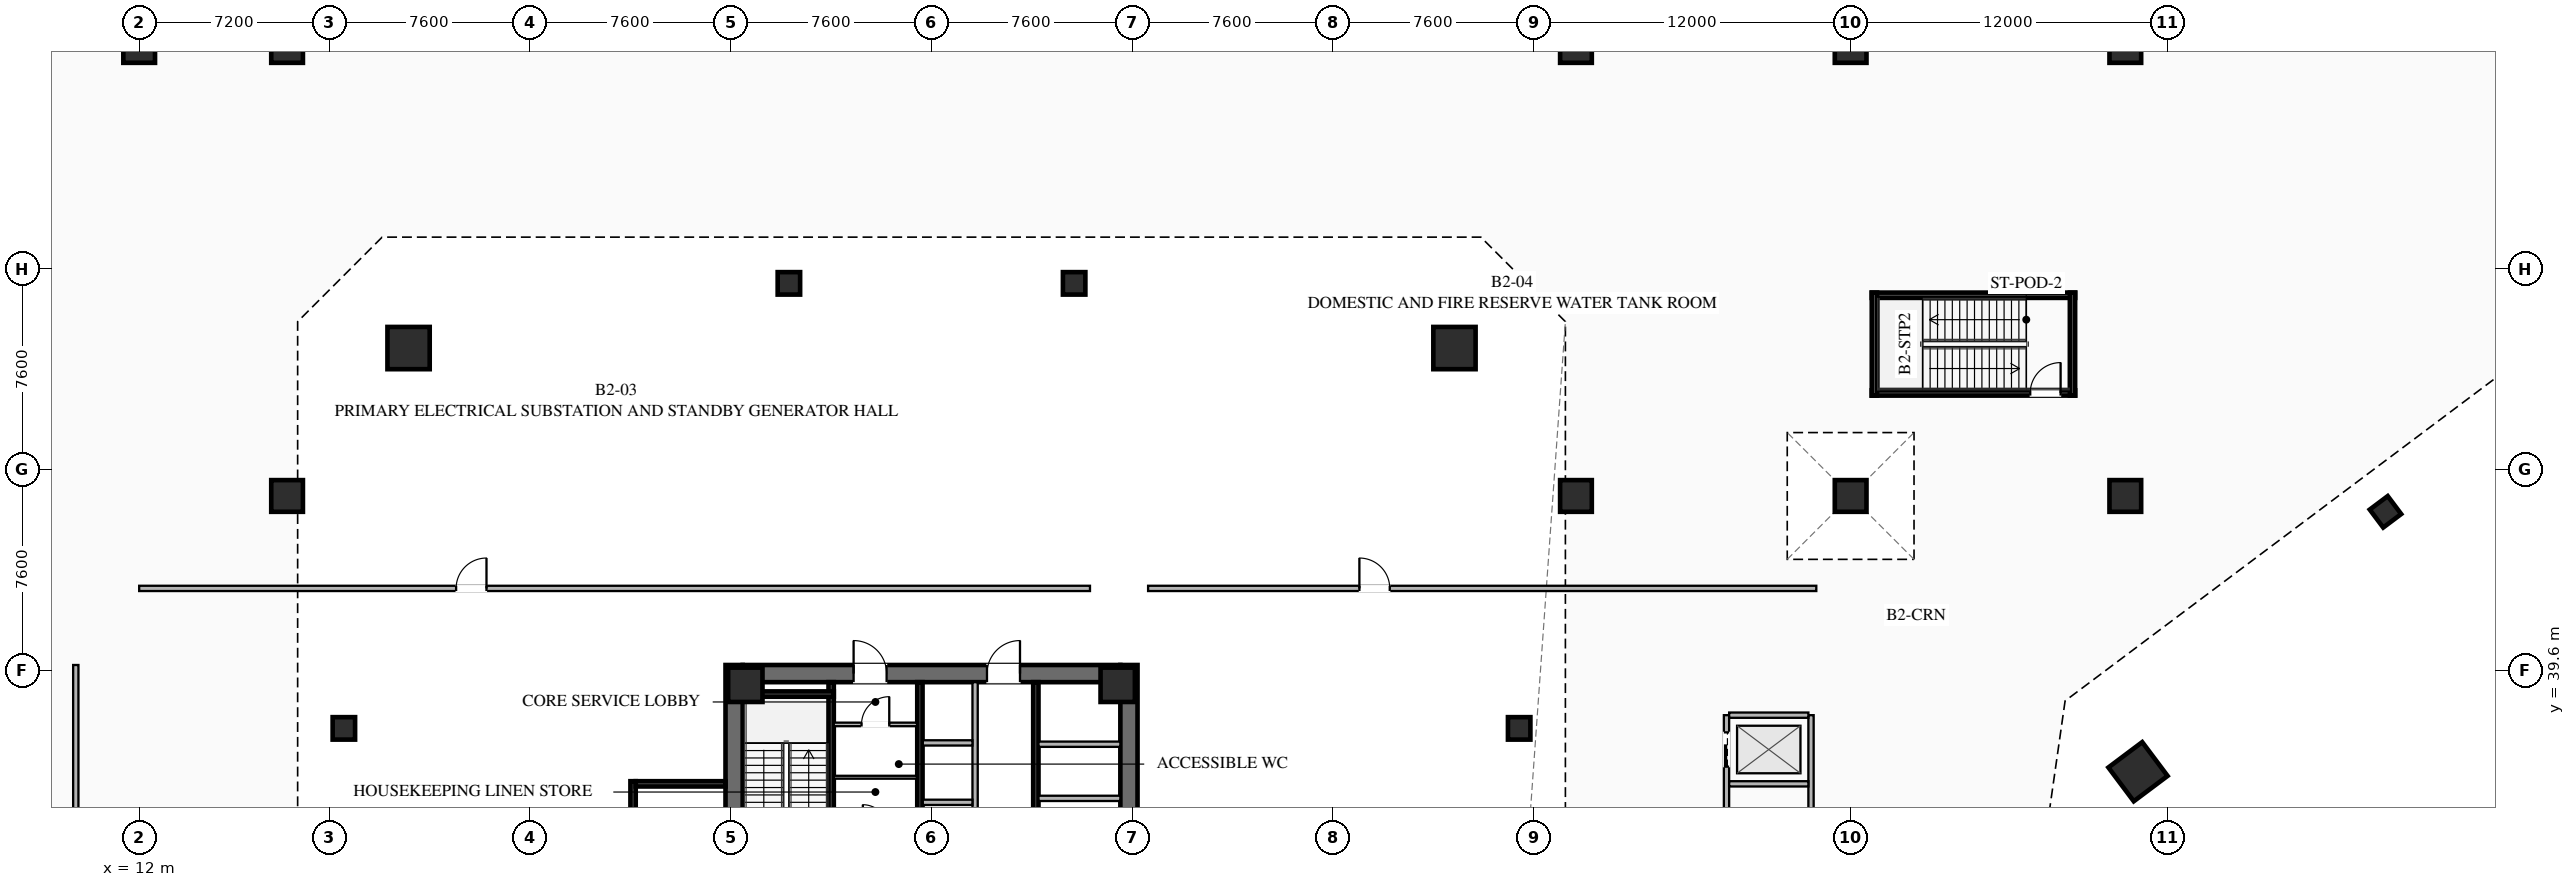
"""IFC4 building model, lengths in metres.
Left out: names, types, materials, properties, quantities, classifications, styles, units other than length and angle.
Written with IfcOpenShell. Run it as: python <this file> out.ifc"""

import sys

from ifc_helpers import new_model, si_unit, direction, frame, frame_2d, origin, origin_2d, place, context, subcontext, project, spatial, rectangle, hollow_rectangle, extrude, element, fill, save


model = new_model("IFC4")
c1 = context("Model", 3, precision=1e-05, world=origin(), true_north=direction((0.0, 1.0)))
c2 = subcontext(c1, "Body", "Model", "MODEL_VIEW")
j1 = project(units=[si_unit("LENGTHUNIT", "METRE"), si_unit("PLANEANGLEUNIT", "RADIAN")], contexts=[c1])
p1 = place(None, origin())
s1 = spatial("IfcSite", under=j1, at=p1, CompositionType="ELEMENT")
p2 = place(p1, origin())
s2 = spatial("IfcBuilding", under=s1, at=p2, CompositionType="ELEMENT")
p3 = place(p2, frame((0.0, 0.0, -11.0)))
s3 = spatial("IfcBuildingStorey", under=s2, at=p3, CompositionType="ELEMENT", Elevation=-11.0)
for number, where, z_axis, x_axis in (
    (1, (34.525, 24.2, 0.0), (0.0, 0.0, 1.0), (0.0, 1.0, 0.0)),
    (2, (49.475, 39.8, 0.0), (0.0, 0.0, 1.0), (0.0, -1.0, 0.0)),
):
    element("IfcWall", number, at=place(p3, frame(where, z_axis=z_axis, x_axis=x_axis)), inside=s3, PredefinedType="SHEAR", context=c2, shape_type="SweptSolid", body=[
        extrude(rectangle(XDim=15.6, YDim=0.65, at=frame_2d((7.8, 0.0))), origin(), (0.0, 0.0, 1.0), 5.5),
    ])
p4 = place(p3, frame((34.85, 39.475, 0.0), z_axis=(0.0, 0.0, 1.0), x_axis=(1.0, 0.0, 0.0)))
e3 = element("IfcWall", 3, at=p4, inside=s3, PredefinedType="SHEAR", context=c2, shape_type="SweptSolid", body=[
    extrude(rectangle(XDim=14.3, YDim=0.65, at=frame_2d((7.15, 0.0))), origin(), (0.0, 0.0, 1.0), 5.5),
])
p5 = place(p4, frame((4.2, 0.0, 0.0)))
e4 = element("IfcOpeningElement", 4, at=p5, cuts=e3, PredefinedType="OPENING", context=c2, shape_type="SweptSolid", body=[
    extrude(rectangle(XDim=1.25, YDim=2.25, at=frame_2d((0.625, 1.125))), frame((0.0, 0.335, 0.0), z_axis=(0.0, -1.0, 0.0), x_axis=(1.0, 0.0, 0.0)), (0.0, 0.0, 1.0), 0.67),
])
p6 = place(p4, frame((9.25, 0.0, 0.0)))
e5 = element("IfcOpeningElement", 5, at=p6, cuts=e3, PredefinedType="OPENING", context=c2, shape_type="SweptSolid", body=[
    extrude(rectangle(XDim=1.25, YDim=2.25, at=frame_2d((0.625, 1.125))), frame((0.0, 0.335, 0.0), z_axis=(0.0, -1.0, 0.0), x_axis=(1.0, 0.0, 0.0)), (0.0, 0.0, 1.0), 0.67),
])
for number, where, z_axis, x_axis in (
    (6, (49.05, 39.05, 0.0), (0.0, 0.0, 1.0), (1.0, 0.0, 0.0)),
    (7, (34.95, 39.05, 0.0), (0.0, 0.0, 1.0), (1.0, 0.0, 0.0)),
):
    element("IfcColumn", number, at=place(p3, frame(where, z_axis=z_axis, x_axis=x_axis)), inside=s3, PredefinedType="COLUMN", context=c2, shape_type="SweptSolid", body=[
        extrude(hollow_rectangle(XDim=1.3, YDim=1.3, WallThickness=0.05, at=origin_2d()), origin(), (0.0, 0.0, 1.0), 5.24),
    ])
for number, where, z_axis, x_axis in (
    (8, (61.8, 51.8, 0.0), (0.0, 0.0, 1.0), (1.0, 0.0, 0.0)),
    (9, (22.2, 51.8, 0.0), (0.0, 0.0, 1.0), (1.0, 0.0, 0.0)),
):
    element("IfcColumn", number, at=place(p3, frame(where, z_axis=z_axis, x_axis=x_axis)), inside=s3, PredefinedType="COLUMN", context=c2, shape_type="SweptSolid", body=[
        extrude(hollow_rectangle(XDim=1.6, YDim=1.6, WallThickness=0.06, at=origin_2d()), origin(), (0.0, 0.0, 1.0), 5.24),
    ])
for number, where, z_axis, x_axis in (
    (10, (64.25, 37.4, 0.0), (0.0, 0.0, 1.0), (1.0, 0.0, 0.0)),
    (11, (47.4, 54.25, 0.0), (0.0, 0.0, 1.0), (1.0, 0.0, 0.0)),
    (12, (36.6, 54.25, 0.0), (0.0, 0.0, 1.0), (1.0, 0.0, 0.0)),
    (13, (19.75, 37.4, 0.0), (0.0, 0.0, 1.0), (1.0, 0.0, 0.0)),
):
    element("IfcColumn", number, at=place(p3, frame(where, z_axis=z_axis, x_axis=x_axis)), inside=s3, PredefinedType="COLUMN", context=c2, shape_type="SweptSolid", body=[
        extrude(hollow_rectangle(XDim=0.85, YDim=0.85, WallThickness=0.035, at=origin_2d()), origin(), (0.0, 0.0, 1.0), 5.24),
    ])
p7 = place(p3, frame((87.68, 35.76, 0.0), z_axis=(0.0, 0.0, 1.0), x_axis=(0.799999996291, 0.600000004945, 0.0)))
e14 = element("IfcColumn", 14, at=p7, inside=s3, PredefinedType="COLUMN", context=c2, shape_type="SweptSolid", body=[
    extrude(hollow_rectangle(XDim=1.6, YDim=1.6, WallThickness=0.06, at=origin_2d()), origin(), (0.0, 0.0, 1.0), 5.24),
])
p8 = place(p3, frame((97.05, 45.6, 0.0), z_axis=(0.0, 0.0, 1.0), x_axis=(0.799999996291, 0.600000004945, 0.0)))
e15 = element("IfcColumn", 15, at=p8, inside=s3, PredefinedType="COLUMN", context=c2, shape_type="SweptSolid", body=[
    extrude(hollow_rectangle(XDim=0.85, YDim=0.85, WallThickness=0.035, at=origin_2d()), origin(), (0.0, 0.0, 1.0), 5.24),
])
for number, where, z_axis, x_axis in (
    (16, (12.0, 63.2, 0.0), (0.0, 0.0, 1.0), (1.0, 0.0, 0.0)),
    (17, (17.6, 63.2, 0.0), (0.0, 0.0, 1.0), (1.0, 0.0, 0.0)),
    (18, (66.4, 63.2, 0.0), (0.0, 0.0, 1.0), (1.0, 0.0, 0.0)),
    (19, (76.8, 63.2, 0.0), (0.0, 0.0, 1.0), (1.0, 0.0, 0.0)),
    (20, (87.2, 63.2, 0.0), (0.0, 0.0, 1.0), (1.0, 0.0, 0.0)),
    (21, (17.6, 46.2, 0.0), (0.0, 0.0, 1.0), (1.0, 0.0, 0.0)),
    (22, (66.4, 46.2, 0.0), (0.0, 0.0, 1.0), (1.0, 0.0, 0.0)),
    (23, (76.8, 46.2, 0.0), (0.0, 0.0, 1.0), (1.0, 0.0, 0.0)),
    (24, (87.2, 46.2, 0.0), (0.0, 0.0, 1.0), (1.0, 0.0, 0.0)),
):
    element("IfcColumn", number, at=place(p3, frame(where, z_axis=z_axis, x_axis=x_axis)), inside=s3, PredefinedType="COLUMN", context=c2, shape_type="SweptSolid", body=[
        extrude(rectangle(XDim=1.2, YDim=1.2, at=origin_2d()), origin(), (0.0, 0.0, 1.0), 5.24),
    ])
p9 = place(p3, frame((38.2, 31.2, 0.0), z_axis=(0.0, 0.0, 1.0), x_axis=(0.0, 1.0, 0.0)))
e25 = element("IfcWall", 25, at=p9, inside=s3, PredefinedType="SHEAR", context=c2, shape_type="SweptSolid", body=[
    extrude(rectangle(XDim=7.95, YDim=0.2, at=frame_2d((3.975, 0.0))), origin(), (0.0, 0.0, 1.0), 5.24),
])
p10 = place(p9, frame((0.45, 0.0, 0.0)))
e26 = element("IfcOpeningElement", 26, at=p10, cuts=e25, PredefinedType="OPENING", context=c2, shape_type="SweptSolid", body=[
    extrude(rectangle(XDim=1.15, YDim=2.2, at=frame_2d((0.575, 1.1))), frame((0.0, 0.11, 0.0), z_axis=(0.0, -1.0, 0.0), x_axis=(1.0, 0.0, 0.0)), (0.0, 0.0, 1.0), 0.22),
])
p11 = place(p3, frame((34.85, 38.7, 0.0), z_axis=(0.0, 0.0, 1.0), x_axis=(1.0, 0.0, 0.0)))
e27 = element("IfcWall", 27, at=p11, inside=s3, PredefinedType="SHEAR", context=c2, shape_type="SweptSolid", body=[
    extrude(rectangle(XDim=3.45, YDim=0.2, at=frame_2d((1.725, 0.0))), origin(), (0.0, 0.0, 1.0), 5.24),
])
p12 = place(p3, frame((41.56, 24.85, 0.0), z_axis=(0.0, 0.0, 1.0), x_axis=(0.0, 1.0, 0.0)))
e28 = element("IfcWall", 28, at=p12, inside=s3, PredefinedType="SHEAR", context=c2, shape_type="SweptSolid", body=[
    extrude(rectangle(XDim=14.3, YDim=0.2, at=frame_2d((7.15, 0.0))), origin(), (0.0, 0.0, 1.0), 5.24),
])
p13 = place(p3, frame((45.95, 39.15, 0.0), z_axis=(0.0, 0.0, 1.0), x_axis=(0.0, -1.0, 0.0)))
e29 = element("IfcWall", 29, at=p13, inside=s3, PredefinedType="SHEAR", context=c2, shape_type="SweptSolid", body=[
    extrude(rectangle(XDim=6.35, YDim=0.2, at=frame_2d((3.175, 0.0))), origin(), (0.0, 0.0, 1.0), 5.24),
])
for number, where, z_axis, x_axis in (
    (30, (46.05, 34.75, 0.0), (0.0, 0.0, 1.0), (1.0, 0.0, 0.0)),
    (31, (46.05, 36.8, 0.0), (0.0, 0.0, 1.0), (1.0, 0.0, 0.0)),
):
    element("IfcWall", number, at=place(p3, frame(where, z_axis=z_axis, x_axis=x_axis)), inside=s3, PredefinedType="SOLIDWALL", context=c2, shape_type="SweptSolid", body=[
        extrude(rectangle(XDim=3.1, YDim=0.2, at=frame_2d((1.55, 0.0))), origin(), (0.0, 0.0, 1.0), 5.24),
    ])
p14 = place(p3, frame((38.3, 37.55, 0.0), z_axis=(0.0, 0.0, 1.0), x_axis=(1.0, 0.0, 0.0)))
e32 = element("IfcWall", 32, at=p14, inside=s3, PredefinedType="PARTITIONING", context=c2, shape_type="SweptSolid", body=[
    extrude(rectangle(XDim=3.15, YDim=0.135, at=frame_2d((1.575, 0.0))), origin(), (0.0, 0.0, 1.0), 4.283),
])
p15 = place(p14, frame((1.05, 0.0, 0.0)))
e33 = element("IfcOpeningElement", 33, at=p15, cuts=e32, PredefinedType="OPENING", context=c2, shape_type="SweptSolid", body=[
    extrude(rectangle(XDim=1.05, YDim=2.2, at=frame_2d((0.525, 1.1))), frame((0.0, 0.077, 0.0), z_axis=(0.0, -1.0, 0.0), x_axis=(1.0, 0.0, 0.0)), (0.0, 0.0, 1.0), 0.155),
])
p16 = place(p3, frame((38.3, 35.55, 0.0), z_axis=(0.0, 0.0, 1.0), x_axis=(1.0, 0.0, 0.0)))
e34 = element("IfcWall", 34, at=p16, inside=s3, PredefinedType="PARTITIONING", context=c2, shape_type="SweptSolid", body=[
    extrude(rectangle(XDim=3.15, YDim=0.11, at=frame_2d((1.575, 0.0))), origin(), (0.0, 0.0, 1.0), 4.283),
])
p17 = place(p3, frame((43.65, 32.35, 0.0), z_axis=(0.0, 0.0, 1.0), x_axis=(0.0, 1.0, 0.0)))
e35 = element("IfcWall", 35, at=p17, inside=s3, PredefinedType="SOLIDWALL", context=c2, shape_type="SweptSolid", body=[
    extrude(rectangle(XDim=6.8, YDim=0.2, at=frame_2d((3.4, 0.0))), origin(), (0.0, 0.0, 1.0), 5.24),
])
for number, where, z_axis, x_axis in (
    (36, (41.67, 34.6, 0.0), (0.0, 0.0, 1.0), (1.0, 0.0, 0.0)),
    (37, (41.67, 36.85, 0.0), (0.0, 0.0, 1.0), (1.0, 0.0, 0.0)),
):
    element("IfcWall", number, at=place(p3, frame(where, z_axis=z_axis, x_axis=x_axis)), inside=s3, PredefinedType="SOLIDWALL", context=c2, shape_type="SweptSolid", body=[
        extrude(rectangle(XDim=1.88, YDim=0.2, at=frame_2d((0.94, 0.0))), origin(), (0.0, 0.0, 1.0), 5.24),
    ])
p18 = place(p3, frame((30.7, 28.6, 0.0), z_axis=(0.0, 0.0, 1.0), x_axis=(0.0, 1.0, 0.0)))
e38 = element("IfcWall", 38, at=p18, inside=s3, PredefinedType="SHEAR", context=c2, shape_type="SweptSolid", body=[
    extrude(rectangle(XDim=6.8, YDim=0.2, at=frame_2d((3.4, 0.0))), origin(), (0.0, 0.0, 1.0), 5.24),
])
p19 = place(p3, frame((30.8, 35.3, 0.0), z_axis=(0.0, 0.0, 1.0), x_axis=(1.0, 0.0, 0.0)))
e39 = element("IfcWall", 39, at=p19, inside=s3, PredefinedType="SHEAR", context=c2, shape_type="SweptSolid", body=[
    extrude(rectangle(XDim=3.4, YDim=0.2, at=frame_2d((1.7, 0.0))), origin(), (0.0, 0.0, 1.0), 5.24),
])
p20 = place(p3, frame((77.6, 50.1, 0.0), z_axis=(0.0, 0.0, 1.0), x_axis=(1.0, 0.0, 0.0)))
e40 = element("IfcWall", 40, at=p20, inside=s3, PredefinedType="SHEAR", context=c2, shape_type="SweptSolid", body=[
    extrude(rectangle(XDim=7.7, YDim=0.2, at=frame_2d((3.85, 0.0))), origin(), (0.0, 0.0, 1.0), 5.24),
])
p21 = place(p20, frame((6.0, 0.0, 0.0)))
e41 = element("IfcOpeningElement", 41, at=p21, cuts=e40, PredefinedType="OPENING", context=c2, shape_type="SweptSolid", body=[
    extrude(rectangle(XDim=1.15, YDim=2.2, at=frame_2d((0.575, 1.1))), frame((0.0, 0.11, 0.0), z_axis=(0.0, -1.0, 0.0), x_axis=(1.0, 0.0, 0.0)), (0.0, 0.0, 1.0), 0.22),
])
p22 = place(p3, frame((77.6, 53.8, 0.0), z_axis=(0.0, 0.0, 1.0), x_axis=(1.0, 0.0, 0.0)))
e42 = element("IfcWall", 42, at=p22, inside=s3, PredefinedType="SHEAR", context=c2, shape_type="SweptSolid", body=[
    extrude(rectangle(XDim=7.7, YDim=0.2, at=frame_2d((3.85, 0.0))), origin(), (0.0, 0.0, 1.0), 5.24),
])
for number, where, z_axis, x_axis in (
    (43, (77.7, 50.0, 0.0), (0.0, 0.0, 1.0), (0.0, 1.0, 0.0)),
    (44, (85.2, 50.0, 0.0), (0.0, 0.0, 1.0), (0.0, 1.0, 0.0)),
):
    element("IfcWall", number, at=place(p3, frame(where, z_axis=z_axis, x_axis=x_axis)), inside=s3, PredefinedType="SHEAR", context=c2, shape_type="SweptSolid", body=[
        extrude(rectangle(XDim=3.9, YDim=0.2, at=frame_2d((1.95, 0.0))), origin(), (0.0, 0.0, 1.0), 5.24),
    ])
p23 = place(p3, frame((72.1, 26.1, 0.0), z_axis=(0.0, 0.0, 1.0), x_axis=(0.0, 1.0, 0.0)))
e45 = element("IfcWall", 45, at=p23, inside=s3, PredefinedType="SOLIDWALL", context=c2, shape_type="SweptSolid", body=[
    extrude(rectangle(XDim=11.8, YDim=0.2, at=frame_2d((5.9, 0.0))), origin(), (0.0, 0.0, 1.0), 4.283),
])
p24 = place(p23, frame((0.65, 0.0, 0.0)))
e46 = element("IfcOpeningElement", 46, at=p24, cuts=e45, PredefinedType="OPENING", context=c2, shape_type="SweptSolid", body=[
    extrude(rectangle(XDim=1.3, YDim=2.25, at=frame_2d((0.65, 1.125))), frame((0.0, 0.11, 0.0), z_axis=(0.0, -1.0, 0.0), x_axis=(1.0, 0.0, 0.0)), (0.0, 0.0, 1.0), 0.22),
])
p25 = place(p23, frame((9.85, 0.0, 0.0)))
e47 = element("IfcOpeningElement", 47, at=p25, cuts=e45, PredefinedType="OPENING", context=c2, shape_type="SweptSolid", body=[
    extrude(rectangle(XDim=1.3, YDim=2.25, at=frame_2d((0.65, 1.125))), frame((0.0, 0.11, 0.0), z_axis=(0.0, -1.0, 0.0), x_axis=(1.0, 0.0, 0.0)), (0.0, 0.0, 1.0), 0.22),
])
p26 = place(p3, frame((75.3, 26.1, 0.0), z_axis=(0.0, 0.0, 1.0), x_axis=(0.0, 1.0, 0.0)))
e48 = element("IfcWall", 48, at=p26, inside=s3, PredefinedType="SOLIDWALL", context=c2, shape_type="SweptSolid", body=[
    extrude(rectangle(XDim=11.8, YDim=0.2, at=frame_2d((5.9, 0.0))), origin(), (0.0, 0.0, 1.0), 4.283),
])
for number, where, z_axis, x_axis in (
    (49, (72.2, 35.3, 0.0), (0.0, 0.0, 1.0), (1.0, 0.0, 0.0)),
    (50, (72.2, 37.9, 0.0), (0.0, 0.0, 1.0), (1.0, 0.0, 0.0)),
):
    element("IfcWall", number, at=place(p3, frame(where, z_axis=z_axis, x_axis=x_axis)), inside=s3, PredefinedType="SOLIDWALL", context=c2, shape_type="SweptSolid", body=[
        extrude(rectangle(XDim=3.0, YDim=0.2, at=frame_2d((1.5, 0.0))), origin(), (0.0, 0.0, 1.0), 4.283),
    ])
p27 = place(p3, frame((9.6, 24.3, 0.0), z_axis=(0.0, 0.0, 1.0), x_axis=(0.0, 1.0, 0.0)))
e51 = element("IfcWall", 51, at=p27, inside=s3, PredefinedType="SOLIDWALL", context=c2, shape_type="SweptSolid", body=[
    extrude(rectangle(XDim=15.5, YDim=0.2, at=frame_2d((7.75, 0.0))), origin(), (0.0, 0.0, 1.0), 4.283),
])
p28 = place(p3, frame((12.0, 42.7, 0.0), z_axis=(0.0, 0.0, 1.0), x_axis=(1.0, 0.0, 0.0)))
e52 = element("IfcWall", 52, at=p28, inside=s3, PredefinedType="SOLIDWALL", context=c2, shape_type="SweptSolid", body=[
    extrude(rectangle(XDim=36.0, YDim=0.2, at=frame_2d((18.0, 0.0))), origin(), (0.0, 0.0, 1.0), 4.283),
])
p29 = place(p28, frame((12.0, 0.0, 0.0)))
e53 = element("IfcOpeningElement", 53, at=p29, cuts=e52, PredefinedType="OPENING", context=c2, shape_type="SweptSolid", body=[
    extrude(rectangle(XDim=1.15, YDim=2.2, at=frame_2d((0.575, 1.1))), frame((0.0, 0.11, 0.0), z_axis=(0.0, -1.0, 0.0), x_axis=(1.0, 0.0, 0.0)), (0.0, 0.0, 1.0), 0.22),
])
p30 = place(p3, frame((50.2, 42.7, 0.0), z_axis=(0.0, 0.0, 1.0), x_axis=(1.0, 0.0, 0.0)))
e54 = element("IfcWall", 54, at=p30, inside=s3, PredefinedType="SOLIDWALL", context=c2, shape_type="SweptSolid", body=[
    extrude(rectangle(XDim=25.3, YDim=0.2, at=frame_2d((12.65, 0.0))), origin(), (0.0, 0.0, 1.0), 4.283),
])
p31 = place(p30, frame((8.0, 0.0, 0.0)))
e55 = element("IfcOpeningElement", 55, at=p31, cuts=e54, PredefinedType="OPENING", context=c2, shape_type="SweptSolid", body=[
    extrude(rectangle(XDim=1.15, YDim=2.2, at=frame_2d((0.575, 1.1))), frame((0.0, 0.11, 0.0), z_axis=(0.0, -1.0, 0.0), x_axis=(1.0, 0.0, 0.0)), (0.0, 0.0, 1.0), 0.22),
])
p32 = place(p5, origin())
e56 = element("IfcDoor", 56, at=p32, inside=s3, OperationType="SINGLE_SWING_LEFT", PredefinedType="DOOR", context=c2, shape_type="SweptSolid", body=[
    extrude(rectangle(XDim=1.25, YDim=2.25, at=frame_2d((0.625, 1.125))), frame((0.0, 0.025, 0.0), z_axis=(0.0, -1.0, 0.0), x_axis=(1.0, 0.0, 0.0)), (0.0, 0.0, 1.0), 0.05),
])
fill(e4, e56)
p33 = place(p6, origin())
e57 = element("IfcDoor", 57, at=p33, inside=s3, OperationType="SINGLE_SWING_RIGHT", PredefinedType="DOOR", context=c2, shape_type="SweptSolid", body=[
    extrude(rectangle(XDim=1.25, YDim=2.25, at=frame_2d((0.625, 1.125))), frame((0.0, 0.025, 0.0), z_axis=(0.0, -1.0, 0.0), x_axis=(1.0, 0.0, 0.0)), (0.0, 0.0, 1.0), 0.05),
])
fill(e5, e57)
p34 = place(p15, origin())
e58 = element("IfcDoor", 58, at=p34, inside=s3, OperationType="SINGLE_SWING_RIGHT", PredefinedType="DOOR", context=c2, shape_type="SweptSolid", body=[
    extrude(rectangle(XDim=1.05, YDim=2.2, at=frame_2d((0.525, 1.1))), frame((0.0, 0.025, 0.0), z_axis=(0.0, -1.0, 0.0), x_axis=(1.0, 0.0, 0.0)), (0.0, 0.0, 1.0), 0.05),
])
fill(e33, e58)
p35 = place(p21, origin())
e59 = element("IfcDoor", 59, at=p35, inside=s3, OperationType="SINGLE_SWING_RIGHT", PredefinedType="DOOR", context=c2, shape_type="SweptSolid", body=[
    extrude(rectangle(XDim=1.15, YDim=2.2, at=frame_2d((0.575, 1.1))), frame((0.0, 0.025, 0.0), z_axis=(0.0, -1.0, 0.0), x_axis=(1.0, 0.0, 0.0)), (0.0, 0.0, 1.0), 0.05),
])
fill(e41, e59)
p36 = place(p29, origin())
e60 = element("IfcDoor", 60, at=p36, inside=s3, OperationType="SINGLE_SWING_RIGHT", PredefinedType="DOOR", context=c2, shape_type="SweptSolid", body=[
    extrude(rectangle(XDim=1.15, YDim=2.2, at=frame_2d((0.575, 1.1))), frame((0.0, 0.025, 0.0), z_axis=(0.0, -1.0, 0.0), x_axis=(1.0, 0.0, 0.0)), (0.0, 0.0, 1.0), 0.05),
])
fill(e53, e60)
p37 = place(p31, origin())
e61 = element("IfcDoor", 61, at=p37, inside=s3, OperationType="SINGLE_SWING_LEFT", PredefinedType="DOOR", context=c2, shape_type="SweptSolid", body=[
    extrude(rectangle(XDim=1.15, YDim=2.2, at=frame_2d((0.575, 1.1))), frame((0.0, 0.025, 0.0), z_axis=(0.0, -1.0, 0.0), x_axis=(1.0, 0.0, 0.0)), (0.0, 0.0, 1.0), 0.05),
])
fill(e55, e61)
p38 = place(p25, origin())
e62 = element("IfcDoor", 62, at=p38, inside=s3, OperationType="SLIDING_TO_LEFT", PredefinedType="DOOR", context=c2, shape_type="SweptSolid", body=[
    extrude(rectangle(XDim=1.3, YDim=2.25, at=frame_2d((0.65, 1.125))), frame((0.0, 0.025, 0.0), z_axis=(0.0, -1.0, 0.0), x_axis=(1.0, 0.0, 0.0)), (0.0, 0.0, 1.0), 0.05),
])
fill(e47, e62)
save(model, sys.argv[1])
